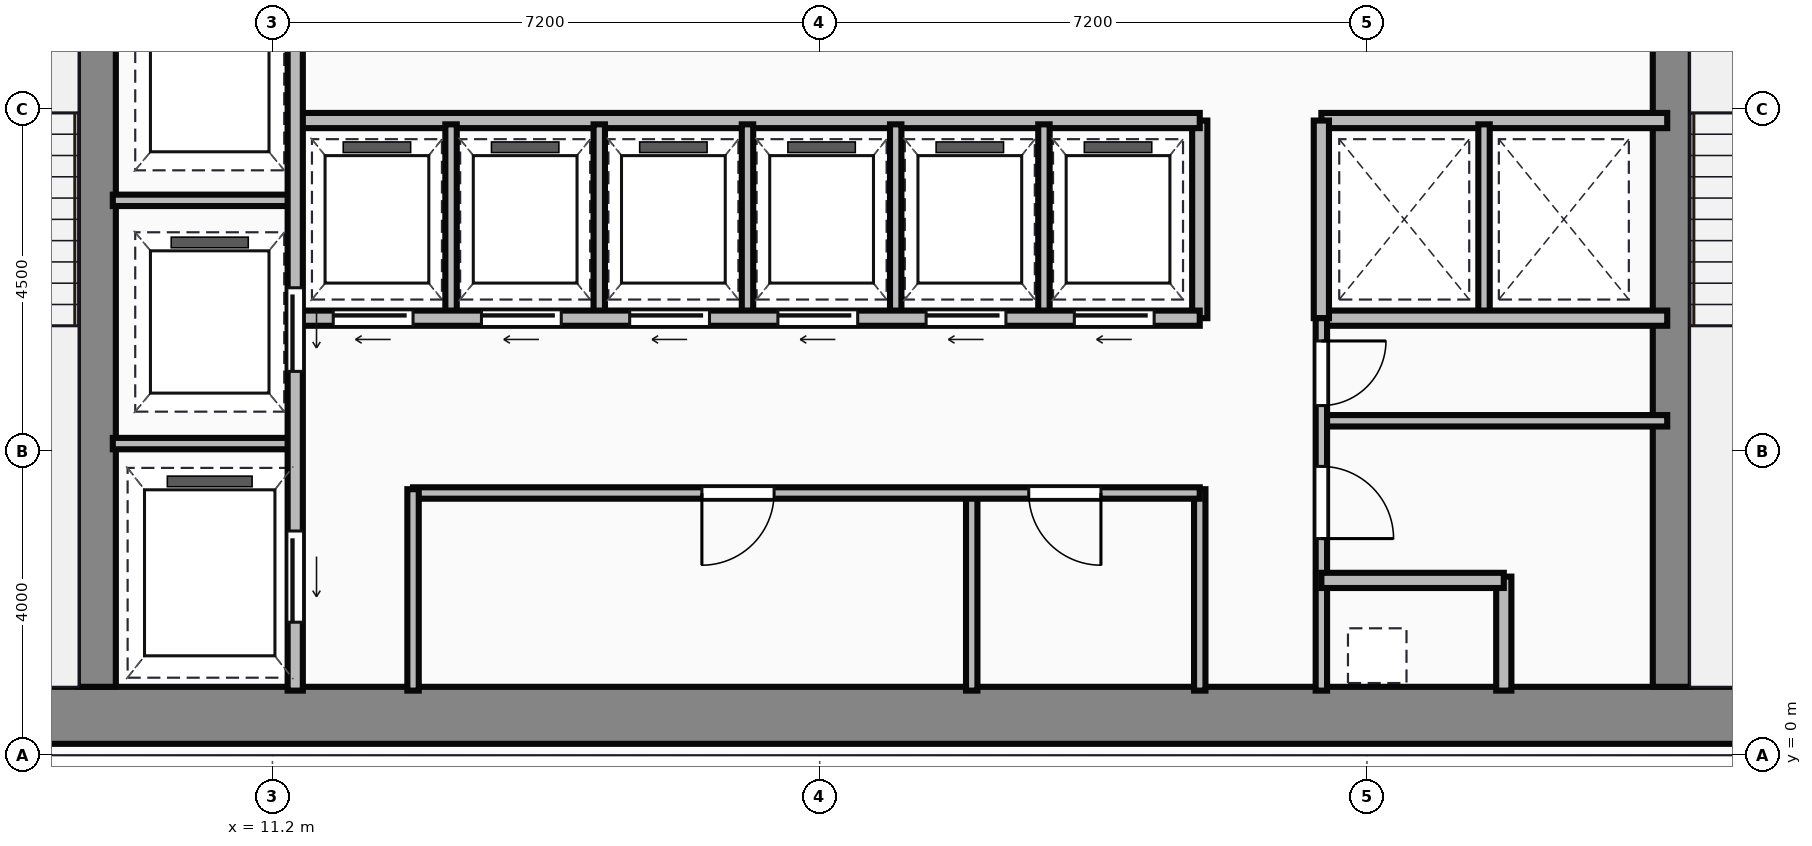
"""IFC4 building model, lengths in metres.
Left out: names, types, materials, properties, quantities, classifications, styles, units other than length and angle.
Written with IfcOpenShell. Run it as: python <this file> out.ifc"""

import sys

from ifc_helpers import new_model, si_unit, direction, frame, frame_2d, origin, place, context, subcontext, project, spatial, rectangle, extrude, source, transform, mapped, element, fill, save


model = new_model("IFC4")
c1 = context("Model", 3, precision=1e-05, world=origin(), true_north=direction((0.0, 1.0)))
c2 = subcontext(c1, "Body", "Model", "MODEL_VIEW")
j1 = project(units=[si_unit("LENGTHUNIT", "METRE"), si_unit("PLANEANGLEUNIT", "RADIAN")], contexts=[c1])
p1 = place(None, origin())
s1 = spatial("IfcSite", under=j1, at=p1, CompositionType="ELEMENT")
p2 = place(p1, origin())
s2 = spatial("IfcBuilding", under=s1, at=p2, CompositionType="ELEMENT")
p3 = place(p2, frame((0.0, 0.0, 169.8)))
s3 = spatial("IfcBuildingStorey", under=s2, at=p3, CompositionType="ELEMENT", Elevation=169.8)
m1 = source(origin(), c2, "Body", "SweptSolid", [
    extrude(rectangle(XDim=29.5, YDim=0.75, at=frame_2d((14.75, 0.0))), origin(), (0.0, 0.0, 1.0), 3.65),
])
p4 = place(p3, frame((4.5, 0.525, 0.0), z_axis=(0.0, 0.0, 1.0), x_axis=(1.0, 0.0, 0.0)))
e1 = element("IfcWall", 1, at=p4, inside=s3, PredefinedType="SHEAR", context=c2, shape_type="MappedRepresentation", body=[
    mapped(m1, transform((0.0, 0.0, 0.0))),
])
m2 = source(origin(), c2, "Body", "SweptSolid", [
    extrude(rectangle(XDim=12.35, YDim=0.5, at=frame_2d((6.175, 0.0))), origin(), (0.0, 0.0, 1.0), 3.65),
])
for number, where, z_axis, x_axis in (
    (2, (8.89, 0.9, 0.0), (0.0, 0.0, 1.0), (0.0, 1.0, 0.0)),
    (3, (29.61, 0.9, 0.0), (0.0, 0.0, 1.0), (0.0, 1.0, 0.0)),
):
    element("IfcWall", number, at=place(p3, frame(where, z_axis=z_axis, x_axis=x_axis)), inside=s3, PredefinedType="SHEAR", context=c2, shape_type="MappedRepresentation", body=[
        mapped(m2, transform((0.0, 0.0, 0.0))),
    ])
m3 = source(origin(), c2, "Body", "SweptSolid", [
    extrude(rectangle(XDim=9.6, YDim=0.2, at=frame_2d((4.8, 0.0))), origin(), (0.0, 0.0, 1.0), 3.4),
])
p5 = place(p3, frame((11.5, 0.85, 0.0), z_axis=(0.0, 0.0, 1.0), x_axis=(0.0, 1.0, 0.0)))
e4 = element("IfcWall", 4, at=p5, inside=s3, PredefinedType="PARTITIONING", context=c2, shape_type="MappedRepresentation", body=[
    mapped(m3, transform((0.0, 0.0, 0.0))),
])
p6 = place(p5, frame((4.2, 0.0, 0.0)))
e5 = element("IfcOpeningElement", 5, at=p6, cuts=e4, PredefinedType="OPENING", context=c2, shape_type="SweptSolid", body=[
    extrude(rectangle(XDim=1.1, YDim=2.15, at=frame_2d((0.55, 1.075))), frame((0.0, 0.11, 0.0), z_axis=(0.0, -1.0, 0.0), x_axis=(1.0, 0.0, 0.0)), (0.0, 0.0, 1.0), 0.22),
])
p7 = place(p5, frame((0.9, 0.0, 0.0)))
e6 = element("IfcOpeningElement", 6, at=p7, cuts=e4, PredefinedType="OPENING", context=c2, shape_type="SweptSolid", body=[
    extrude(rectangle(XDim=1.2, YDim=2.15, at=frame_2d((0.6, 1.075))), frame((0.0, 0.11, 0.0), z_axis=(0.0, -1.0, 0.0), x_axis=(1.0, 0.0, 0.0)), (0.0, 0.0, 1.0), 0.22),
])
m4 = source(origin(), c2, "Body", "SweptSolid", [
    extrude(rectangle(XDim=2.4, YDim=0.15, at=frame_2d((1.2, 0.0))), origin(), (0.0, 0.0, 1.0), 3.4),
])
for number, where, z_axis, x_axis in (
    (7, (9.1, 4.1, 0.0), (0.0, 0.0, 1.0), (1.0, 0.0, 0.0)),
    (8, (9.1, 7.3, 0.0), (0.0, 0.0, 1.0), (1.0, 0.0, 0.0)),
):
    element("IfcWall", number, at=place(p3, frame(where, z_axis=z_axis, x_axis=x_axis)), inside=s3, PredefinedType="PARTITIONING", context=c2, shape_type="MappedRepresentation", body=[
        mapped(m4, transform((0.0, 0.0, 0.0))),
    ])
m5 = source(origin(), c2, "Body", "SweptSolid", [
    extrude(rectangle(XDim=2.65, YDim=0.15, at=frame_2d((1.325, 0.0))), origin(), (0.0, 0.0, 1.0), 3.4),
])
p8 = place(p3, frame((13.05, 0.85, 0.0), z_axis=(0.0, 0.0, 1.0), x_axis=(0.0, 1.0, 0.0)))
e9 = element("IfcWall", 9, at=p8, inside=s3, PredefinedType="PARTITIONING", context=c2, shape_type="MappedRepresentation", body=[
    mapped(m5, transform((0.0, 0.0, 0.0))),
])
m6 = source(origin(), c2, "Body", "SweptSolid", [
    extrude(rectangle(XDim=10.35, YDim=0.15, at=frame_2d((5.175, 0.0))), origin(), (0.0, 0.0, 1.0), 3.4),
])
p9 = place(p3, frame((13.05, 3.45, 0.0), z_axis=(0.0, 0.0, 1.0), x_axis=(1.0, 0.0, 0.0)))
e10 = element("IfcWall", 10, at=p9, inside=s3, PredefinedType="PARTITIONING", context=c2, shape_type="MappedRepresentation", body=[
    mapped(m6, transform((0.0, 0.0, 0.0))),
])
p10 = place(p9, frame((3.8, 0.0, 0.0)))
e11 = element("IfcOpeningElement", 11, at=p10, cuts=e10, PredefinedType="OPENING", context=c2, shape_type="SweptSolid", body=[
    extrude(rectangle(XDim=0.95, YDim=2.15, at=frame_2d((0.475, 1.075))), frame((0.0, 0.085, 0.0), z_axis=(0.0, -1.0, 0.0), x_axis=(1.0, 0.0, 0.0)), (0.0, 0.0, 1.0), 0.17),
])
p11 = place(p9, frame((8.1, 0.0, 0.0)))
e12 = element("IfcOpeningElement", 12, at=p11, cuts=e10, PredefinedType="OPENING", context=c2, shape_type="SweptSolid", body=[
    extrude(rectangle(XDim=0.95, YDim=2.15, at=frame_2d((0.475, 1.075))), frame((0.0, 0.085, 0.0), z_axis=(0.0, -1.0, 0.0), x_axis=(1.0, 0.0, 0.0)), (0.0, 0.0, 1.0), 0.17),
])
p12 = place(p3, frame((23.4, 0.85, 0.0), z_axis=(0.0, 0.0, 1.0), x_axis=(0.0, 1.0, 0.0)))
e13 = element("IfcWall", 13, at=p12, inside=s3, PredefinedType="PARTITIONING", context=c2, shape_type="MappedRepresentation", body=[
    mapped(m5, transform((0.0, 0.0, 0.0))),
])
m7 = source(origin(), c2, "Body", "SweptSolid", [
    extrude(rectangle(XDim=2.6, YDim=0.15, at=frame_2d((1.3, 0.0))), origin(), (0.0, 0.0, 1.0), 3.4),
])
p13 = place(p3, frame((20.4, 0.85, 0.0), z_axis=(0.0, 0.0, 1.0), x_axis=(0.0, 1.0, 0.0)))
e14 = element("IfcWall", 14, at=p13, inside=s3, PredefinedType="PARTITIONING", context=c2, shape_type="MappedRepresentation", body=[
    mapped(m7, transform((0.0, 0.0, 0.0))),
])
m8 = source(origin(), c2, "Body", "SweptSolid", [
    extrude(rectangle(XDim=11.85, YDim=0.2, at=frame_2d((5.925, 0.0))), origin(), (0.0, 0.0, 1.0), 3.4),
])
p14 = place(p3, frame((11.55, 5.75, 0.0), z_axis=(0.0, 0.0, 1.0), x_axis=(1.0, 0.0, 0.0)))
e15 = element("IfcWall", 15, at=p14, inside=s3, PredefinedType="PARTITIONING", context=c2, shape_type="MappedRepresentation", body=[
    mapped(m8, transform((0.0, 0.0, 0.0))),
])
p15 = place(p14, frame((0.45, 0.0, 0.0)))
e16 = element("IfcOpeningElement", 16, at=p15, cuts=e15, PredefinedType="OPENING", context=c2, shape_type="SweptSolid", body=[
    extrude(rectangle(XDim=1.05, YDim=2.15, at=frame_2d((0.525, 1.075))), frame((0.0, 0.11, 0.0), z_axis=(0.0, -1.0, 0.0), x_axis=(1.0, 0.0, 0.0)), (0.0, 0.0, 1.0), 0.22),
])
p16 = place(p14, frame((2.4, 0.0, 0.0)))
e17 = element("IfcOpeningElement", 17, at=p16, cuts=e15, PredefinedType="OPENING", context=c2, shape_type="SweptSolid", body=[
    extrude(rectangle(XDim=1.05, YDim=2.15, at=frame_2d((0.525, 1.075))), frame((0.0, 0.11, 0.0), z_axis=(0.0, -1.0, 0.0), x_axis=(1.0, 0.0, 0.0)), (0.0, 0.0, 1.0), 0.22),
])
p17 = place(p14, frame((4.35, 0.0, 0.0)))
e18 = element("IfcOpeningElement", 18, at=p17, cuts=e15, PredefinedType="OPENING", context=c2, shape_type="SweptSolid", body=[
    extrude(rectangle(XDim=1.05, YDim=2.15, at=frame_2d((0.525, 1.075))), frame((0.0, 0.11, 0.0), z_axis=(0.0, -1.0, 0.0), x_axis=(1.0, 0.0, 0.0)), (0.0, 0.0, 1.0), 0.22),
])
p18 = place(p14, frame((6.3, 0.0, 0.0)))
e19 = element("IfcOpeningElement", 19, at=p18, cuts=e15, PredefinedType="OPENING", context=c2, shape_type="SweptSolid", body=[
    extrude(rectangle(XDim=1.05, YDim=2.15, at=frame_2d((0.525, 1.075))), frame((0.0, 0.11, 0.0), z_axis=(0.0, -1.0, 0.0), x_axis=(1.0, 0.0, 0.0)), (0.0, 0.0, 1.0), 0.22),
])
p19 = place(p14, frame((8.25, 0.0, 0.0)))
e20 = element("IfcOpeningElement", 20, at=p19, cuts=e15, PredefinedType="OPENING", context=c2, shape_type="SweptSolid", body=[
    extrude(rectangle(XDim=1.05, YDim=2.15, at=frame_2d((0.525, 1.075))), frame((0.0, 0.11, 0.0), z_axis=(0.0, -1.0, 0.0), x_axis=(1.0, 0.0, 0.0)), (0.0, 0.0, 1.0), 0.22),
])
p20 = place(p14, frame((10.2, 0.0, 0.0)))
e21 = element("IfcOpeningElement", 21, at=p20, cuts=e15, PredefinedType="OPENING", context=c2, shape_type="SweptSolid", body=[
    extrude(rectangle(XDim=1.05, YDim=2.15, at=frame_2d((0.525, 1.075))), frame((0.0, 0.11, 0.0), z_axis=(0.0, -1.0, 0.0), x_axis=(1.0, 0.0, 0.0)), (0.0, 0.0, 1.0), 0.22),
])
p21 = place(p3, frame((11.55, 8.35, 0.0), z_axis=(0.0, 0.0, 1.0), x_axis=(1.0, 0.0, 0.0)))
e22 = element("IfcWall", 22, at=p21, inside=s3, PredefinedType="PARTITIONING", context=c2, shape_type="MappedRepresentation", body=[
    mapped(m8, transform((0.0, 0.0, 0.0))),
])
m9 = source(origin(), c2, "Body", "SweptSolid", [
    extrude(rectangle(XDim=2.6, YDim=0.2, at=frame_2d((1.3, 0.0))), origin(), (0.0, 0.0, 1.0), 3.4),
])
p22 = place(p3, frame((23.4, 5.75, 0.0), z_axis=(0.0, 0.0, 1.0), x_axis=(0.0, 1.0, 0.0)))
e23 = element("IfcWall", 23, at=p22, inside=s3, PredefinedType="PARTITIONING", context=c2, shape_type="MappedRepresentation", body=[
    mapped(m9, transform((0.0, 0.0, 0.0))),
])
m10 = source(origin(), c2, "Body", "SweptSolid", [
    extrude(rectangle(XDim=2.5, YDim=0.15, at=frame_2d((1.25, 0.0))), origin(), (0.0, 0.0, 1.0), 3.4),
])
for number, where, z_axis, x_axis in (
    (24, (13.55, 5.8, 0.0), (0.0, 0.0, 1.0), (0.0, 1.0, 0.0)),
    (25, (15.5, 5.8, 0.0), (0.0, 0.0, 1.0), (0.0, 1.0, 0.0)),
    (26, (17.45, 5.8, 0.0), (0.0, 0.0, 1.0), (0.0, 1.0, 0.0)),
    (27, (19.4, 5.8, 0.0), (0.0, 0.0, 1.0), (0.0, 1.0, 0.0)),
    (28, (21.35, 5.8, 0.0), (0.0, 0.0, 1.0), (0.0, 1.0, 0.0)),
):
    element("IfcWall", number, at=place(p3, frame(where, z_axis=z_axis, x_axis=x_axis)), inside=s3, PredefinedType="PARTITIONING", context=c2, shape_type="MappedRepresentation", body=[
        mapped(m10, transform((0.0, 0.0, 0.0))),
    ])
m11 = source(origin(), c2, "Body", "SweptSolid", [
    extrude(rectangle(XDim=4.55, YDim=0.2, at=frame_2d((2.275, 0.0))), origin(), (0.0, 0.0, 1.0), 3.4),
])
for number, where, z_axis, x_axis in (
    (29, (25.0, 8.35, 0.0), (0.0, 0.0, 1.0), (1.0, 0.0, 0.0)),
    (30, (25.0, 5.75, 0.0), (0.0, 0.0, 1.0), (1.0, 0.0, 0.0)),
):
    element("IfcWall", number, at=place(p3, frame(where, z_axis=z_axis, x_axis=x_axis)), inside=s3, PredefinedType="PARTITIONING", context=c2, shape_type="MappedRepresentation", body=[
        mapped(m11, transform((0.0, 0.0, 0.0))),
    ])
p23 = place(p3, frame((25.0, 5.75, 0.0), z_axis=(0.0, 0.0, 1.0), x_axis=(0.0, 1.0, 0.0)))
e31 = element("IfcWall", 31, at=p23, inside=s3, PredefinedType="PARTITIONING", context=c2, shape_type="MappedRepresentation", body=[
    mapped(m9, transform((0.0, 0.0, 0.0))),
])
p24 = place(p3, frame((27.14, 5.8, 0.0), z_axis=(0.0, 0.0, 1.0), x_axis=(0.0, 1.0, 0.0)))
e32 = element("IfcWall", 32, at=p24, inside=s3, PredefinedType="PARTITIONING", context=c2, shape_type="MappedRepresentation", body=[
    mapped(m10, transform((0.0, 0.0, 0.0))),
])
m12 = source(origin(), c2, "Body", "SweptSolid", [
    extrude(rectangle(XDim=4.9, YDim=0.15, at=frame_2d((2.45, 0.0))), origin(), (0.0, 0.0, 1.0), 3.4),
])
p25 = place(p3, frame((25.0, 0.85, 0.0), z_axis=(0.0, 0.0, 1.0), x_axis=(0.0, 1.0, 0.0)))
e33 = element("IfcWall", 33, at=p25, inside=s3, PredefinedType="PARTITIONING", context=c2, shape_type="MappedRepresentation", body=[
    mapped(m12, transform((0.0, 0.0, 0.0))),
])
p26 = place(p25, frame((2.0, 0.0, 0.0)))
e34 = element("IfcOpeningElement", 34, at=p26, cuts=e33, PredefinedType="OPENING", context=c2, shape_type="SweptSolid", body=[
    extrude(rectangle(XDim=0.95, YDim=2.15, at=frame_2d((0.475, 1.075))), frame((0.0, 0.085, 0.0), z_axis=(0.0, -1.0, 0.0), x_axis=(1.0, 0.0, 0.0)), (0.0, 0.0, 1.0), 0.17),
])
p27 = place(p25, frame((3.75, 0.0, 0.0)))
e35 = element("IfcOpeningElement", 35, at=p27, cuts=e33, PredefinedType="OPENING", context=c2, shape_type="SweptSolid", body=[
    extrude(rectangle(XDim=0.85, YDim=2.15, at=frame_2d((0.425, 1.075))), frame((0.0, 0.085, 0.0), z_axis=(0.0, -1.0, 0.0), x_axis=(1.0, 0.0, 0.0)), (0.0, 0.0, 1.0), 0.17),
])
m13 = source(origin(), c2, "Body", "SweptSolid", [
    extrude(rectangle(XDim=2.4, YDim=0.2, at=frame_2d((1.2, 0.0))), origin(), (0.0, 0.0, 1.0), 3.4),
])
p28 = place(p3, frame((25.0, 2.3, 0.0), z_axis=(0.0, 0.0, 1.0), x_axis=(1.0, 0.0, 0.0)))
e36 = element("IfcWall", 36, at=p28, inside=s3, PredefinedType="PARTITIONING", context=c2, shape_type="MappedRepresentation", body=[
    mapped(m13, transform((0.0, 0.0, 0.0))),
])
m14 = source(origin(), c2, "Body", "SweptSolid", [
    extrude(rectangle(XDim=1.5, YDim=0.2, at=frame_2d((0.75, 0.0))), origin(), (0.0, 0.0, 1.0), 3.4),
])
p29 = place(p3, frame((27.4, 0.85, 0.0), z_axis=(0.0, 0.0, 1.0), x_axis=(0.0, 1.0, 0.0)))
e37 = element("IfcWall", 37, at=p29, inside=s3, PredefinedType="PARTITIONING", context=c2, shape_type="MappedRepresentation", body=[
    mapped(m14, transform((0.0, 0.0, 0.0))),
])
m15 = source(origin(), c2, "Body", "SweptSolid", [
    extrude(rectangle(XDim=4.55, YDim=0.15, at=frame_2d((2.275, 0.0))), origin(), (0.0, 0.0, 1.0), 3.4),
])
p30 = place(p3, frame((25.0, 4.4, 0.0), z_axis=(0.0, 0.0, 1.0), x_axis=(1.0, 0.0, 0.0)))
e38 = element("IfcWall", 38, at=p30, inside=s3, PredefinedType="PARTITIONING", context=c2, shape_type="MappedRepresentation", body=[
    mapped(m15, transform((0.0, 0.0, 0.0))),
])
m16 = source(origin(), c2, "Body", "SweptSolid", [
    extrude(rectangle(XDim=1.1, YDim=2.15, at=frame_2d((0.55, 1.075))), frame((0.0, 0.025, 0.0), z_axis=(0.0, -1.0, 0.0), x_axis=(1.0, 0.0, 0.0)), (0.0, 0.0, 1.0), 0.05),
])
p31 = place(p6, frame((1.1, 0.0, 0.0), z_axis=(0.0, 0.0, 1.0), x_axis=(-1.0, 0.0, 0.0)))
e39 = element("IfcDoor", 39, at=p31, inside=s3, OperationType="SLIDING_TO_LEFT", PredefinedType="DOOR", context=c2, shape_type="MappedRepresentation", body=[
    mapped(m16, transform((0.0, 0.0, 0.0))),
])
fill(e5, e39)
m17 = source(origin(), c2, "Body", "SweptSolid", [
    extrude(rectangle(XDim=1.2, YDim=2.15, at=frame_2d((0.6, 1.075))), frame((0.0, 0.025, 0.0), z_axis=(0.0, -1.0, 0.0), x_axis=(1.0, 0.0, 0.0)), (0.0, 0.0, 1.0), 0.05),
])
p32 = place(p7, frame((1.2, 0.0, 0.0), z_axis=(0.0, 0.0, 1.0), x_axis=(-1.0, 0.0, 0.0)))
e40 = element("IfcDoor", 40, at=p32, inside=s3, OperationType="SLIDING_TO_LEFT", PredefinedType="DOOR", context=c2, shape_type="MappedRepresentation", body=[
    mapped(m17, transform((0.0, 0.0, 0.0))),
])
fill(e6, e40)
m18 = source(origin(), c2, "Body", "SweptSolid", [
    extrude(rectangle(XDim=0.95, YDim=2.15, at=frame_2d((0.475, 1.075))), frame((0.0, 0.025, 0.0), z_axis=(0.0, -1.0, 0.0), x_axis=(1.0, 0.0, 0.0)), (0.0, 0.0, 1.0), 0.05),
])
p33 = place(p10, origin())
e41 = element("IfcDoor", 41, at=p33, inside=s3, OperationType="SINGLE_SWING_LEFT", PredefinedType="DOOR", context=c2, shape_type="MappedRepresentation", body=[
    mapped(m18, transform((0.0, 0.0, 0.0))),
])
fill(e11, e41)
p34 = place(p11, origin())
e42 = element("IfcDoor", 42, at=p34, inside=s3, OperationType="SINGLE_SWING_RIGHT", PredefinedType="DOOR", context=c2, shape_type="MappedRepresentation", body=[
    mapped(m18, transform((0.0, 0.0, 0.0))),
])
fill(e12, e42)
m19 = source(origin(), c2, "Body", "SweptSolid", [
    extrude(rectangle(XDim=1.05, YDim=2.15, at=frame_2d((0.525, 1.075))), frame((0.0, 0.025, 0.0), z_axis=(0.0, -1.0, 0.0), x_axis=(1.0, 0.0, 0.0)), (0.0, 0.0, 1.0), 0.05),
])
p35 = place(p15, frame((1.05, 0.0, 0.0), z_axis=(0.0, 0.0, 1.0), x_axis=(-1.0, 0.0, 0.0)))
e43 = element("IfcDoor", 43, at=p35, inside=s3, OperationType="SLIDING_TO_LEFT", PredefinedType="DOOR", context=c2, shape_type="MappedRepresentation", body=[
    mapped(m19, transform((0.0, 0.0, 0.0))),
])
fill(e16, e43)
p36 = place(p16, frame((1.05, 0.0, 0.0), z_axis=(0.0, 0.0, 1.0), x_axis=(-1.0, 0.0, 0.0)))
e44 = element("IfcDoor", 44, at=p36, inside=s3, OperationType="SLIDING_TO_LEFT", PredefinedType="DOOR", context=c2, shape_type="MappedRepresentation", body=[
    mapped(m19, transform((0.0, 0.0, 0.0))),
])
fill(e17, e44)
p37 = place(p17, frame((1.05, 0.0, 0.0), z_axis=(0.0, 0.0, 1.0), x_axis=(-1.0, 0.0, 0.0)))
e45 = element("IfcDoor", 45, at=p37, inside=s3, OperationType="SLIDING_TO_LEFT", PredefinedType="DOOR", context=c2, shape_type="MappedRepresentation", body=[
    mapped(m19, transform((0.0, 0.0, 0.0))),
])
fill(e18, e45)
p38 = place(p18, frame((1.05, 0.0, 0.0), z_axis=(0.0, 0.0, 1.0), x_axis=(-1.0, 0.0, 0.0)))
e46 = element("IfcDoor", 46, at=p38, inside=s3, OperationType="SLIDING_TO_LEFT", PredefinedType="DOOR", context=c2, shape_type="MappedRepresentation", body=[
    mapped(m19, transform((0.0, 0.0, 0.0))),
])
fill(e19, e46)
p39 = place(p19, frame((1.05, 0.0, 0.0), z_axis=(0.0, 0.0, 1.0), x_axis=(-1.0, 0.0, 0.0)))
e47 = element("IfcDoor", 47, at=p39, inside=s3, OperationType="SLIDING_TO_LEFT", PredefinedType="DOOR", context=c2, shape_type="MappedRepresentation", body=[
    mapped(m19, transform((0.0, 0.0, 0.0))),
])
fill(e20, e47)
p40 = place(p20, frame((1.05, 0.0, 0.0), z_axis=(0.0, 0.0, 1.0), x_axis=(-1.0, 0.0, 0.0)))
e48 = element("IfcDoor", 48, at=p40, inside=s3, OperationType="SLIDING_TO_LEFT", PredefinedType="DOOR", context=c2, shape_type="MappedRepresentation", body=[
    mapped(m19, transform((0.0, 0.0, 0.0))),
])
fill(e21, e48)
p41 = place(p26, origin())
e49 = element("IfcDoor", 49, at=p41, inside=s3, OperationType="SINGLE_SWING_LEFT", PredefinedType="DOOR", context=c2, shape_type="MappedRepresentation", body=[
    mapped(m18, transform((0.0, 0.0, 0.0))),
])
fill(e34, e49)
m20 = source(origin(), c2, "Body", "SweptSolid", [
    extrude(rectangle(XDim=0.85, YDim=2.15, at=frame_2d((0.425, 1.075))), frame((0.0, 0.025, 0.0), z_axis=(0.0, -1.0, 0.0), x_axis=(1.0, 0.0, 0.0)), (0.0, 0.0, 1.0), 0.05),
])
p42 = place(p27, origin())
e50 = element("IfcDoor", 50, at=p42, inside=s3, OperationType="SINGLE_SWING_RIGHT", PredefinedType="DOOR", context=c2, shape_type="MappedRepresentation", body=[
    mapped(m20, transform((0.0, 0.0, 0.0))),
])
fill(e35, e50)
save(model, sys.argv[1])
